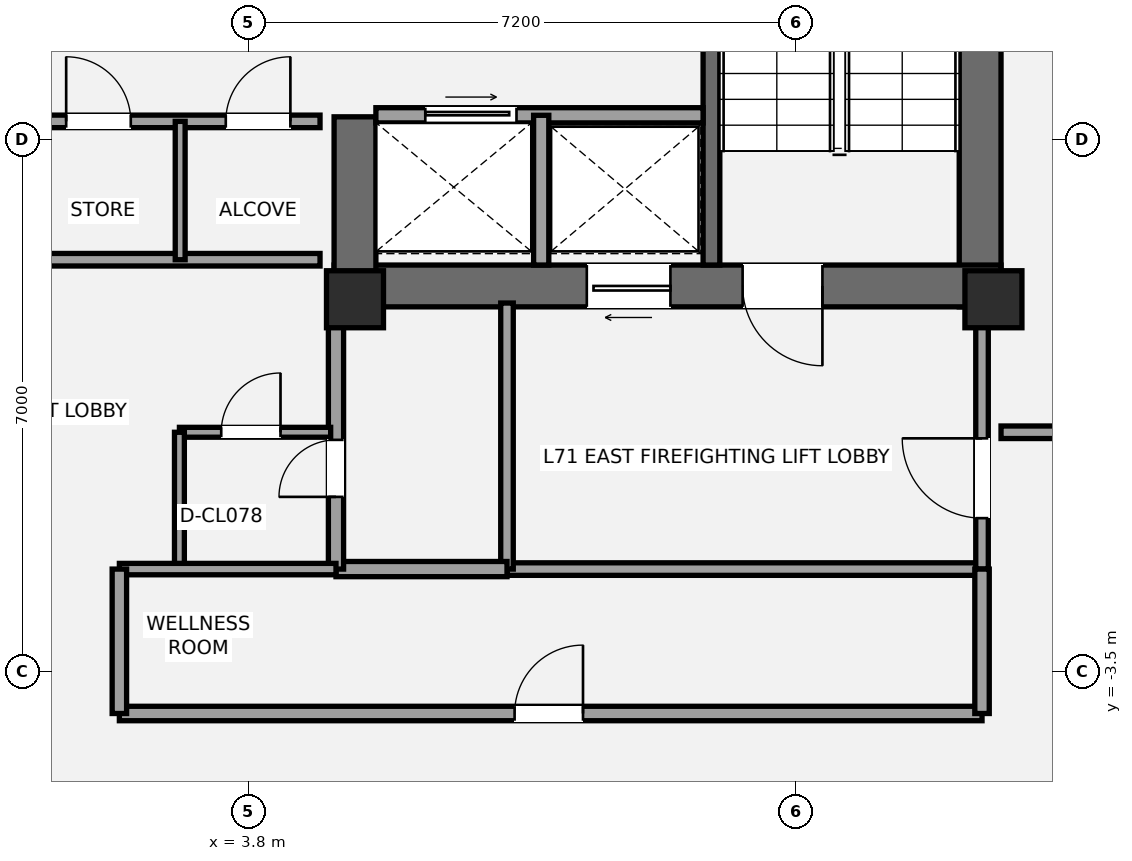
"""IFC4 building model, lengths in metres.
Left out: names, types, materials, properties, quantities, classifications, styles, units other than length and angle.
Written with IfcOpenShell. Run it as: python <this file> out.ifc"""

import sys

from ifc_helpers import new_model, si_unit, direction, frame, frame_2d, origin, origin_2d, place, context, subcontext, project, spatial, rectangle, extrude, element, fill, save


model = new_model("IFC4")
c1 = context("Model", 3, precision=1e-05, world=origin(), true_north=direction((0.0, 1.0)))
c2 = subcontext(c1, "Body", "Model", "MODEL_VIEW")
j1 = project(units=[si_unit("LENGTHUNIT", "METRE"), si_unit("PLANEANGLEUNIT", "RADIAN")], contexts=[c1])
p1 = place(None, origin())
s1 = spatial("IfcSite", under=j1, at=p1, CompositionType="ELEMENT")
p2 = place(p1, origin())
s2 = spatial("IfcBuilding", under=s1, at=p2, CompositionType="ELEMENT")
p3 = place(p2, frame((0.0, 0.0, 250.95)))
s3 = spatial("IfcBuildingStorey", under=s2, at=p3, CompositionType="ELEMENT", Elevation=250.95)
p4 = place(p3, frame((13.425, 1.3, 0.0), z_axis=(0.0, 0.0, 1.0), x_axis=(0.0, 1.0, 0.0)))
e1 = element("IfcWall", 1, at=p4, inside=s3, PredefinedType="SHEAR", context=c2, shape_type="SweptSolid", body=[
    extrude(rectangle(XDim=8.25, YDim=0.55, at=frame_2d((4.125, 0.0))), origin(), (0.0, 0.0, 1.0), 3.15),
])
p5 = place(p3, frame((13.7, 1.575, 0.0), z_axis=(0.0, 0.0, 1.0), x_axis=(-1.0, 0.0, 0.0)))
e2 = element("IfcWall", 2, at=p5, inside=s3, PredefinedType="SHEAR", context=c2, shape_type="SweptSolid", body=[
    extrude(rectangle(XDim=8.775, YDim=0.55, at=frame_2d((4.387, 0.0))), origin(), (0.0, 0.0, 1.0), 3.15),
])
p6 = place(p5, frame((2.35, 0.0, 0.0)))
e3 = element("IfcOpeningElement", 3, at=p6, cuts=e2, PredefinedType="OPENING", context=c2, shape_type="SweptSolid", body=[
    extrude(rectangle(XDim=1.05, YDim=2.15, at=frame_2d((0.525, 1.075))), frame((0.0, 0.285, 0.0), z_axis=(0.0, -1.0, 0.0), x_axis=(1.0, 0.0, 0.0)), (0.0, 0.0, 1.0), 0.57),
])
p7 = place(p5, frame((4.35, 0.0, 0.0)))
e4 = element("IfcOpeningElement", 4, at=p7, cuts=e2, PredefinedType="OPENING", context=c2, shape_type="SweptSolid", body=[
    extrude(rectangle(XDim=1.1, YDim=2.2, at=frame_2d((0.55, 1.1))), frame((0.0, 0.285, 0.0), z_axis=(0.0, -1.0, 0.0), x_axis=(1.0, 0.0, 0.0)), (0.0, 0.0, 1.0), 0.57),
])
p8 = place(p3, frame((5.2, 1.3, 0.0), z_axis=(0.0, 0.0, 1.0), x_axis=(0.0, 1.0, 0.0)))
e5 = element("IfcWall", 5, at=p8, inside=s3, PredefinedType="SHEAR", context=c2, shape_type="SweptSolid", body=[
    extrude(rectangle(XDim=2.5, YDim=0.55, at=frame_2d((1.25, 0.0))), origin(), (0.0, 0.0, 1.0), 3.15),
])
p9 = place(p3, frame((9.89, 1.85, 0.0), z_axis=(0.0, 0.0, 1.0), x_axis=(0.0, 1.0, 0.0)))
e6 = element("IfcWall", 6, at=p9, inside=s3, PredefinedType="SHEAR", context=c2, shape_type="SweptSolid", body=[
    extrude(rectangle(XDim=7.15, YDim=0.22, at=frame_2d((3.575, 0.0))), origin(), (0.0, 0.0, 1.0), 3.15),
])
for number, where, z_axis, x_axis in (
    (7, (5.2, 1.4, 0.0), (0.0, 0.0, 1.0), (1.0, 0.0, 0.0)),
    (8, (13.6, 1.4, 0.0), (0.0, 0.0, 1.0), (1.0, 0.0, 0.0)),
):
    element("IfcColumn", number, at=place(p3, frame(where, z_axis=z_axis, x_axis=x_axis)), inside=s3, PredefinedType="PILASTER", context=c2, shape_type="SweptSolid", body=[
        extrude(rectangle(XDim=0.75, YDim=0.75, at=origin_2d()), origin(), (0.0, 0.0, 1.0), 3.15),
    ])
p10 = place(p3, frame((7.2, -2.15, 0.0), z_axis=(0.0, 0.0, 1.0), x_axis=(1.0, 0.0, 0.0)))
e9 = element("IfcWall", 9, at=p10, inside=s3, PredefinedType="PARTITIONING", context=c2, shape_type="SweptSolid", body=[
    extrude(rectangle(XDim=6.25, YDim=0.165, at=frame_2d((3.125, 0.0))), origin(), (0.0, 0.0, 1.0), 2.97),
])
p11 = place(p3, frame((7.2, -2.15, 0.0), z_axis=(0.0, 0.0, 1.0), x_axis=(0.0, 1.0, 0.0)))
e10 = element("IfcWall", 10, at=p11, inside=s3, PredefinedType="PARTITIONING", context=c2, shape_type="SweptSolid", body=[
    extrude(rectangle(XDim=3.5, YDim=0.165, at=frame_2d((1.75, 0.0))), origin(), (0.0, 0.0, 1.0), 2.423),
])
p12 = place(p3, frame((13.45, -2.15, 0.0), z_axis=(0.0, 0.0, 1.0), x_axis=(0.0, 1.0, 0.0)))
e11 = element("IfcWall", 11, at=p12, inside=s3, PredefinedType="PARTITIONING", context=c2, shape_type="SweptSolid", body=[
    extrude(rectangle(XDim=3.5, YDim=0.165, at=frame_2d((1.75, 0.0))), origin(), (0.0, 0.0, 1.0), 2.97),
])
p13 = place(p12, frame((0.67, 0.0, 0.0)))
e12 = element("IfcOpeningElement", 12, at=p13, cuts=e11, PredefinedType="OPENING", context=c2, shape_type="SweptSolid", body=[
    extrude(rectangle(XDim=1.05, YDim=2.15, at=frame_2d((0.525, 1.075))), frame((0.0, 0.093, 0.0), z_axis=(0.0, -1.0, 0.0), x_axis=(1.0, 0.0, 0.0)), (0.0, 0.0, 1.0), 0.185),
])
p14 = place(p3, frame((4.95, -2.15, 0.0), z_axis=(0.0, 0.0, 1.0), x_axis=(1.0, 0.0, 0.0)))
e13 = element("IfcWall", 13, at=p14, inside=s3, PredefinedType="SOLIDWALL", context=c2, shape_type="SweptSolid", body=[
    extrude(rectangle(XDim=2.25, YDim=0.2, at=frame_2d((1.125, 0.0))), origin(), (0.0, 0.0, 1.0), 2.97),
])
p15 = place(p3, frame((4.95, -2.15, 0.0), z_axis=(0.0, 0.0, 1.0), x_axis=(0.0, 1.0, 0.0)))
e14 = element("IfcWall", 14, at=p15, inside=s3, PredefinedType="SOLIDWALL", context=c2, shape_type="SweptSolid", body=[
    extrude(rectangle(XDim=3.5, YDim=0.2, at=frame_2d((1.75, 0.0))), origin(), (0.0, 0.0, 1.0), 2.423),
])
p16 = place(p15, frame((0.95, 0.0, 0.0)))
e15 = element("IfcOpeningElement", 15, at=p16, cuts=e14, PredefinedType="OPENING", context=c2, shape_type="SweptSolid", body=[
    extrude(rectangle(XDim=0.75, YDim=2.1, at=frame_2d((0.375, 1.05))), frame((0.0, 0.11, 0.0), z_axis=(0.0, -1.0, 0.0), x_axis=(1.0, 0.0, 0.0)), (0.0, 0.0, 1.0), 0.22),
])
p17 = place(p3, frame((2.89, -0.35, 0.0), z_axis=(0.0, 0.0, 1.0), x_axis=(1.0, 0.0, 0.0)))
e16 = element("IfcWall", 16, at=p17, inside=s3, PredefinedType="PARTITIONING", context=c2, shape_type="SweptSolid", body=[
    extrude(rectangle(XDim=1.99, YDim=0.13, at=frame_2d((0.995, 0.0))), origin(), (0.0, 0.0, 1.0), 2.97),
])
p18 = place(p17, frame((0.55, 0.0, 0.0)))
e17 = element("IfcOpeningElement", 17, at=p18, cuts=e16, PredefinedType="OPENING", context=c2, shape_type="SweptSolid", body=[
    extrude(rectangle(XDim=0.78, YDim=2.1, at=frame_2d((0.39, 1.05))), frame((0.0, 0.075, 0.0), z_axis=(0.0, -1.0, 0.0), x_axis=(1.0, 0.0, 0.0)), (0.0, 0.0, 1.0), 0.15),
])
p19 = place(p3, frame((2.89, -2.15, 0.0), z_axis=(0.0, 0.0, 1.0), x_axis=(0.0, 1.0, 0.0)))
e18 = element("IfcWall", 18, at=p19, inside=s3, PredefinedType="PARTITIONING", context=c2, shape_type="SweptSolid", body=[
    extrude(rectangle(XDim=1.8, YDim=0.13, at=frame_2d((0.9, 0.0))), origin(), (0.0, 0.0, 1.0), 2.97),
])
p20 = place(p3, frame((5.475, 3.82, 0.0), z_axis=(0.0, 0.0, 1.0), x_axis=(1.0, 0.0, 0.0)))
e19 = element("IfcWall", 19, at=p20, inside=s3, PredefinedType="SOLIDWALL", context=c2, shape_type="SweptSolid", body=[
    extrude(rectangle(XDim=4.305, YDim=0.2, at=frame_2d((2.152, 0.0))), origin(), (0.0, 0.0, 1.0), 2.97),
])
p21 = place(p20, frame((0.65, 0.0, 0.0)))
e20 = element("IfcOpeningElement", 20, at=p21, cuts=e19, PredefinedType="OPENING", context=c2, shape_type="SweptSolid", body=[
    extrude(rectangle(XDim=1.2, YDim=2.2, at=frame_2d((0.6, 1.1))), frame((0.0, 0.11, 0.0), z_axis=(0.0, -1.0, 0.0), x_axis=(1.0, 0.0, 0.0)), (0.0, 0.0, 1.0), 0.22),
])
p22 = place(p3, frame((7.65, 1.85, 0.0), z_axis=(0.0, 0.0, 1.0), x_axis=(0.0, 1.0, 0.0)))
e21 = element("IfcWall", 21, at=p22, inside=s3, PredefinedType="SOLIDWALL", context=c2, shape_type="SweptSolid", body=[
    extrude(rectangle(XDim=1.97, YDim=0.2, at=frame_2d((0.985, 0.0))), origin(), (0.0, 0.0, 1.0), 2.97),
])
p23 = place(p3, frame((0.85, 1.92, 0.0), z_axis=(0.0, 0.0, 1.0), x_axis=(1.0, 0.0, 0.0)))
e22 = element("IfcWall", 22, at=p23, inside=s3, PredefinedType="PARTITIONING", context=c2, shape_type="SweptSolid", body=[
    extrude(rectangle(XDim=3.89, YDim=0.165, at=frame_2d((1.945, 0.0))), origin(), (0.0, 0.0, 1.0), 2.11),
])
p24 = place(p3, frame((0.85, 3.74, 0.0), z_axis=(0.0, 0.0, 1.0), x_axis=(1.0, 0.0, 0.0)))
e23 = element("IfcWall", 23, at=p24, inside=s3, PredefinedType="PARTITIONING", context=c2, shape_type="SweptSolid", body=[
    extrude(rectangle(XDim=3.89, YDim=0.165, at=frame_2d((1.945, 0.0))), origin(), (0.0, 0.0, 1.0), 2.97),
])
p25 = place(p24, frame((0.55, 0.0, 0.0)))
e24 = element("IfcOpeningElement", 24, at=p25, cuts=e23, PredefinedType="OPENING", context=c2, shape_type="SweptSolid", body=[
    extrude(rectangle(XDim=0.85, YDim=2.1, at=frame_2d((0.425, 1.05))), frame((0.0, 0.093, 0.0), z_axis=(0.0, -1.0, 0.0), x_axis=(1.0, 0.0, 0.0)), (0.0, 0.0, 1.0), 0.185),
])
p26 = place(p24, frame((2.65, 0.0, 0.0)))
e25 = element("IfcOpeningElement", 25, at=p26, cuts=e23, PredefinedType="OPENING", context=c2, shape_type="SweptSolid", body=[
    extrude(rectangle(XDim=0.85, YDim=2.1, at=frame_2d((0.425, 1.05))), frame((0.0, 0.093, 0.0), z_axis=(0.0, -1.0, 0.0), x_axis=(1.0, 0.0, 0.0)), (0.0, 0.0, 1.0), 0.185),
])
p27 = place(p3, frame((2.9, 1.92, 0.0), z_axis=(0.0, 0.0, 1.0), x_axis=(0.0, 1.0, 0.0)))
e26 = element("IfcWall", 26, at=p27, inside=s3, PredefinedType="PARTITIONING", context=c2, shape_type="SweptSolid", body=[
    extrude(rectangle(XDim=1.82, YDim=0.13, at=frame_2d((0.91, 0.0))), origin(), (0.0, 0.0, 1.0), 2.97),
])
p28 = place(p3, frame((2.1, -4.05, 0.0), z_axis=(0.0, 0.0, 1.0), x_axis=(1.0, 0.0, 0.0)))
e27 = element("IfcWall", 27, at=p28, inside=s3, PredefinedType="PLUMBINGWALL", context=c2, shape_type="SweptSolid", body=[
    extrude(rectangle(XDim=11.35, YDim=0.19, at=frame_2d((5.675, 0.0))), origin(), (0.0, 0.0, 1.0), 2.357),
])
p29 = place(p28, frame((5.2, 0.0, 0.0)))
e28 = element("IfcOpeningElement", 28, at=p29, cuts=e27, PredefinedType="OPENING", context=c2, shape_type="SweptSolid", body=[
    extrude(rectangle(XDim=0.9, YDim=2.1, at=frame_2d((0.45, 1.05))), frame((0.0, 0.105, 0.0), z_axis=(0.0, -1.0, 0.0), x_axis=(1.0, 0.0, 0.0)), (0.0, 0.0, 1.0), 0.21),
])
p30 = place(p3, frame((2.1, -2.15, 0.0), z_axis=(0.0, 0.0, 1.0), x_axis=(1.0, 0.0, 0.0)))
e29 = element("IfcWall", 29, at=p30, inside=s3, PredefinedType="PLUMBINGWALL", context=c2, shape_type="SweptSolid", body=[
    extrude(rectangle(XDim=2.85, YDim=0.15, at=frame_2d((1.425, 0.0))), origin(), (0.0, 0.0, 1.0), 2.423),
])
p31 = place(p3, frame((2.1, -4.05, 0.0), z_axis=(0.0, 0.0, 1.0), x_axis=(0.0, 1.0, 0.0)))
e30 = element("IfcWall", 30, at=p31, inside=s3, PredefinedType="PLUMBINGWALL", context=c2, shape_type="SweptSolid", body=[
    extrude(rectangle(XDim=1.9, YDim=0.19, at=frame_2d((0.95, 0.0))), origin(), (0.0, 0.0, 1.0), 2.97),
])
p32 = place(p3, frame((13.45, -4.05, 0.0), z_axis=(0.0, 0.0, 1.0), x_axis=(0.0, 1.0, 0.0)))
e31 = element("IfcWall", 31, at=p32, inside=s3, PredefinedType="PLUMBINGWALL", context=c2, shape_type="SweptSolid", body=[
    extrude(rectangle(XDim=1.9, YDim=0.19, at=frame_2d((0.95, 0.0))), origin(), (0.0, 0.0, 1.0), 2.423),
])
p33 = place(p3, frame((13.7, -0.35, 0.0), z_axis=(0.0, 0.0, 1.0), x_axis=(1.0, 0.0, 0.0)))
e32 = element("IfcWall", 32, at=p33, inside=s3, PredefinedType="PARTITIONING", context=c2, shape_type="SweptSolid", body=[
    extrude(rectangle(XDim=2.5, YDim=0.165, at=frame_2d((1.25, 0.0))), origin(), (0.0, 0.0, 1.0), 2.423),
])
p34 = place(p6, origin())
e33 = element("IfcDoor", 33, at=p34, inside=s3, OperationType="SINGLE_SWING_LEFT", PredefinedType="DOOR", context=c2, shape_type="SweptSolid", body=[
    extrude(rectangle(XDim=1.05, YDim=2.15, at=frame_2d((0.525, 1.075))), frame((0.0, 0.025, 0.0), z_axis=(0.0, -1.0, 0.0), x_axis=(1.0, 0.0, 0.0)), (0.0, 0.0, 1.0), 0.05),
])
fill(e3, e33)
p35 = place(p13, origin())
e34 = element("IfcDoor", 34, at=p35, inside=s3, OperationType="SINGLE_SWING_RIGHT", PredefinedType="DOOR", context=c2, shape_type="SweptSolid", body=[
    extrude(rectangle(XDim=1.05, YDim=2.15, at=frame_2d((0.525, 1.075))), frame((0.0, 0.025, 0.0), z_axis=(0.0, -1.0, 0.0), x_axis=(1.0, 0.0, 0.0)), (0.0, 0.0, 1.0), 0.05),
])
fill(e12, e34)
p36 = place(p16, origin())
e35 = element("IfcDoor", 35, at=p36, inside=s3, OperationType="SINGLE_SWING_LEFT", PredefinedType="DOOR", context=c2, shape_type="SweptSolid", body=[
    extrude(rectangle(XDim=0.75, YDim=2.1, at=frame_2d((0.375, 1.05))), frame((0.0, 0.025, 0.0), z_axis=(0.0, -1.0, 0.0), x_axis=(1.0, 0.0, 0.0)), (0.0, 0.0, 1.0), 0.05),
])
fill(e15, e35)
p37 = place(p18, origin())
e36 = element("IfcDoor", 36, at=p37, inside=s3, OperationType="SINGLE_SWING_RIGHT", PredefinedType="DOOR", context=c2, shape_type="SweptSolid", body=[
    extrude(rectangle(XDim=0.78, YDim=2.1, at=frame_2d((0.39, 1.05))), frame((0.0, 0.025, 0.0), z_axis=(0.0, -1.0, 0.0), x_axis=(1.0, 0.0, 0.0)), (0.0, 0.0, 1.0), 0.05),
])
fill(e17, e36)
p38 = place(p7, origin())
e37 = element("IfcDoor", 37, at=p38, inside=s3, OperationType="SLIDING_TO_LEFT", PredefinedType="DOOR", context=c2, shape_type="SweptSolid", body=[
    extrude(rectangle(XDim=1.1, YDim=2.2, at=frame_2d((0.55, 1.1))), frame((0.0, 0.025, 0.0), z_axis=(0.0, -1.0, 0.0), x_axis=(1.0, 0.0, 0.0)), (0.0, 0.0, 1.0), 0.05),
])
fill(e4, e37)
p39 = place(p21, origin())
e38 = element("IfcDoor", 38, at=p39, inside=s3, OperationType="SLIDING_TO_RIGHT", PredefinedType="DOOR", context=c2, shape_type="SweptSolid", body=[
    extrude(rectangle(XDim=1.2, YDim=2.2, at=frame_2d((0.6, 1.1))), frame((0.0, 0.025, 0.0), z_axis=(0.0, -1.0, 0.0), x_axis=(1.0, 0.0, 0.0)), (0.0, 0.0, 1.0), 0.05),
])
fill(e20, e38)
p40 = place(p25, origin())
e39 = element("IfcDoor", 39, at=p40, inside=s3, OperationType="SINGLE_SWING_LEFT", PredefinedType="DOOR", context=c2, shape_type="SweptSolid", body=[
    extrude(rectangle(XDim=0.85, YDim=2.1, at=frame_2d((0.425, 1.05))), frame((0.0, 0.025, 0.0), z_axis=(0.0, -1.0, 0.0), x_axis=(1.0, 0.0, 0.0)), (0.0, 0.0, 1.0), 0.05),
])
fill(e24, e39)
p41 = place(p26, origin())
e40 = element("IfcDoor", 40, at=p41, inside=s3, OperationType="SINGLE_SWING_RIGHT", PredefinedType="DOOR", context=c2, shape_type="SweptSolid", body=[
    extrude(rectangle(XDim=0.85, YDim=2.1, at=frame_2d((0.425, 1.05))), frame((0.0, 0.025, 0.0), z_axis=(0.0, -1.0, 0.0), x_axis=(1.0, 0.0, 0.0)), (0.0, 0.0, 1.0), 0.05),
])
fill(e25, e40)
p42 = place(p29, origin())
e41 = element("IfcDoor", 41, at=p42, inside=s3, OperationType="SINGLE_SWING_RIGHT", PredefinedType="DOOR", context=c2, shape_type="SweptSolid", body=[
    extrude(rectangle(XDim=0.9, YDim=2.1, at=frame_2d((0.45, 1.05))), frame((0.0, 0.025, 0.0), z_axis=(0.0, -1.0, 0.0), x_axis=(1.0, 0.0, 0.0)), (0.0, 0.0, 1.0), 0.05),
])
fill(e28, e41)
save(model, sys.argv[1])
